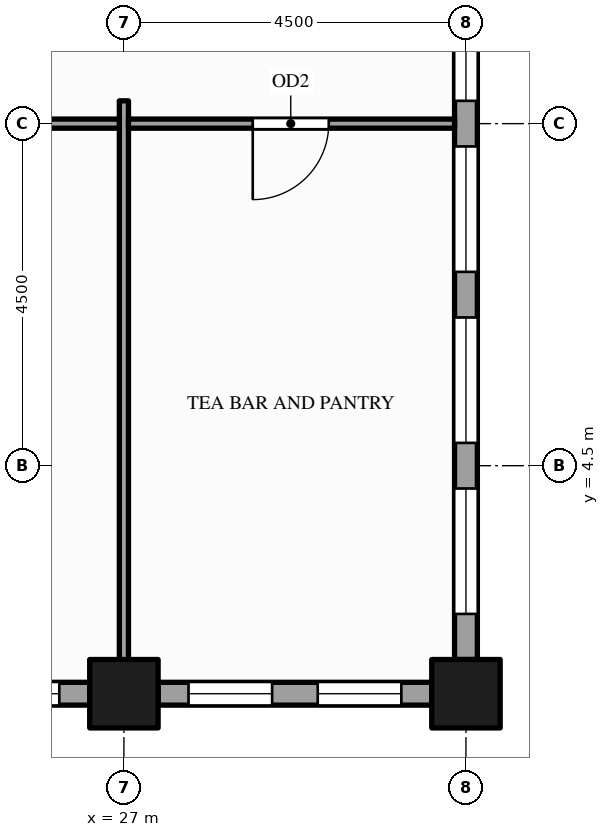
"""IFC4 building model, lengths in metres.
Left out: names, types, materials, properties, quantities, classifications, styles, units other than length and angle.
Written with IfcOpenShell. Run it as: python <this file> out.ifc"""

import sys

from ifc_helpers import new_model, si_unit, direction, frame, frame_2d, origin, origin_2d, place, context, subcontext, project, spatial, rectangle, hollow_rectangle, extrude, element, fill, save


model = new_model("IFC4")
c1 = context("Model", 3, precision=1e-05, world=origin(), true_north=direction((0.0, 1.0)))
c2 = subcontext(c1, "Body", "Model", "MODEL_VIEW")
j1 = project(units=[si_unit("LENGTHUNIT", "METRE"), si_unit("PLANEANGLEUNIT", "RADIAN")], contexts=[c1])
p1 = place(None, origin())
s1 = spatial("IfcSite", under=j1, at=p1, CompositionType="ELEMENT")
p2 = place(p1, origin())
s2 = spatial("IfcBuilding", under=s1, at=p2, CompositionType="ELEMENT")
p3 = place(p2, frame((0.0, 0.0, 139.0)))
s3 = spatial("IfcBuildingStorey", under=s2, at=p3, CompositionType="ELEMENT", Elevation=139.0)
for number, where, z_axis, x_axis in (
    (1, (27.0, 1.5, -0.15), (0.0, 0.0, 1.0), (1.0, 0.0, 0.0)),
    (2, (31.5, 1.5, -0.15), (0.0, 0.0, 1.0), (1.0, 0.0, 0.0)),
):
    element("IfcColumn", number, at=place(p3, frame(where, z_axis=z_axis, x_axis=x_axis)), inside=s3, PredefinedType="COLUMN", context=c2, shape_type="SweptSolid", body=[
        extrude(hollow_rectangle(XDim=0.9, YDim=0.9, WallThickness=0.045, at=origin_2d()), origin(), (0.0, 0.0, 1.0), 4.0),
    ])
p4 = place(p3, frame((22.95, 1.5, 0.0), z_axis=(0.0, 0.0, 1.0), x_axis=(1.0, 0.0, 0.0)))
e3 = element("IfcWall", 3, at=p4, inside=s3, PredefinedType="STANDARD", context=c2, shape_type="SweptSolid", body=[
    extrude(rectangle(XDim=3.6, YDim=0.3, at=frame_2d((1.8, 0.0))), origin(), (0.0, 0.0, 1.0), 2.87),
])
p5 = place(p4, frame((0.4, 0.0, 0.9)))
e4 = element("IfcOpeningElement", 4, at=p5, cuts=e3, PredefinedType="OPENING", context=c2, shape_type="SweptSolid", body=[
    extrude(rectangle(XDim=1.1, YDim=1.75, at=frame_2d((0.55, 0.875))), frame((0.0, 0.16, 0.0), z_axis=(0.0, -1.0, 0.0), x_axis=(1.0, 0.0, 0.0)), (0.0, 0.0, 1.0), 0.32),
])
p6 = place(p4, frame((2.1, 0.0, 0.9)))
e5 = element("IfcOpeningElement", 5, at=p6, cuts=e3, PredefinedType="OPENING", context=c2, shape_type="SweptSolid", body=[
    extrude(rectangle(XDim=1.1, YDim=1.75, at=frame_2d((0.55, 0.875))), frame((0.0, 0.16, 0.0), z_axis=(0.0, -1.0, 0.0), x_axis=(1.0, 0.0, 0.0)), (0.0, 0.0, 1.0), 0.32),
])
p7 = place(p3, frame((27.45, 1.5, 0.0), z_axis=(0.0, 0.0, 1.0), x_axis=(1.0, 0.0, 0.0)))
e6 = element("IfcWall", 6, at=p7, inside=s3, PredefinedType="STANDARD", context=c2, shape_type="SweptSolid", body=[
    extrude(rectangle(XDim=3.6, YDim=0.3, at=frame_2d((1.8, 0.0))), origin(), (0.0, 0.0, 1.0), 2.87),
])
p8 = place(p7, frame((0.4, 0.0, 0.9)))
e7 = element("IfcOpeningElement", 7, at=p8, cuts=e6, PredefinedType="OPENING", context=c2, shape_type="SweptSolid", body=[
    extrude(rectangle(XDim=1.1, YDim=1.75, at=frame_2d((0.55, 0.875))), frame((0.0, 0.16, 0.0), z_axis=(0.0, -1.0, 0.0), x_axis=(1.0, 0.0, 0.0)), (0.0, 0.0, 1.0), 0.32),
])
p9 = place(p7, frame((2.1, 0.0, 0.9)))
e8 = element("IfcOpeningElement", 8, at=p9, cuts=e6, PredefinedType="OPENING", context=c2, shape_type="SweptSolid", body=[
    extrude(rectangle(XDim=1.1, YDim=1.75, at=frame_2d((0.55, 0.875))), frame((0.0, 0.16, 0.0), z_axis=(0.0, -1.0, 0.0), x_axis=(1.0, 0.0, 0.0)), (0.0, 0.0, 1.0), 0.32),
])
p10 = place(p3, frame((31.5, 1.95, 0.0), z_axis=(0.0, 0.0, 1.0), x_axis=(0.0, 1.0, 0.0)))
e9 = element("IfcWall", 9, at=p10, inside=s3, PredefinedType="STANDARD", context=c2, shape_type="SweptSolid", body=[
    extrude(rectangle(XDim=21.6, YDim=0.3, at=frame_2d((10.8, 0.0))), origin(), (0.0, 0.0, 1.0), 3.149),
])
p11 = place(p10, frame((0.6, 0.0, 0.9)))
e10 = element("IfcOpeningElement", 10, at=p11, cuts=e9, PredefinedType="OPENING", context=c2, shape_type="SweptSolid", body=[
    extrude(rectangle(XDim=1.65, YDim=2.0, at=frame_2d((0.825, 1.0))), frame((0.0, 0.16, 0.0), z_axis=(0.0, -1.0, 0.0), x_axis=(1.0, 0.0, 0.0)), (0.0, 0.0, 1.0), 0.32),
])
p12 = place(p10, frame((2.85, 0.0, 0.9)))
e11 = element("IfcOpeningElement", 11, at=p12, cuts=e9, PredefinedType="OPENING", context=c2, shape_type="SweptSolid", body=[
    extrude(rectangle(XDim=1.65, YDim=2.0, at=frame_2d((0.825, 1.0))), frame((0.0, 0.16, 0.0), z_axis=(0.0, -1.0, 0.0), x_axis=(1.0, 0.0, 0.0)), (0.0, 0.0, 1.0), 0.32),
])
p13 = place(p10, frame((5.1, 0.0, 0.9)))
e12 = element("IfcOpeningElement", 12, at=p13, cuts=e9, PredefinedType="OPENING", context=c2, shape_type="SweptSolid", body=[
    extrude(rectangle(XDim=1.65, YDim=2.0, at=frame_2d((0.825, 1.0))), frame((0.0, 0.16, 0.0), z_axis=(0.0, -1.0, 0.0), x_axis=(1.0, 0.0, 0.0)), (0.0, 0.0, 1.0), 0.32),
])
p14 = place(p10, frame((7.35, 0.0, 0.9)))
e13 = element("IfcOpeningElement", 13, at=p14, cuts=e9, PredefinedType="OPENING", context=c2, shape_type="SweptSolid", body=[
    extrude(rectangle(XDim=1.65, YDim=2.0, at=frame_2d((0.825, 1.0))), frame((0.0, 0.16, 0.0), z_axis=(0.0, -1.0, 0.0), x_axis=(1.0, 0.0, 0.0)), (0.0, 0.0, 1.0), 0.32),
])
p15 = place(p10, frame((9.6, 0.0, 0.9)))
e14 = element("IfcOpeningElement", 14, at=p15, cuts=e9, PredefinedType="OPENING", context=c2, shape_type="SweptSolid", body=[
    extrude(rectangle(XDim=1.65, YDim=2.0, at=frame_2d((0.825, 1.0))), frame((0.0, 0.16, 0.0), z_axis=(0.0, -1.0, 0.0), x_axis=(1.0, 0.0, 0.0)), (0.0, 0.0, 1.0), 0.32),
])
p16 = place(p10, frame((11.85, 0.0, 0.9)))
e15 = element("IfcOpeningElement", 15, at=p16, cuts=e9, PredefinedType="OPENING", context=c2, shape_type="SweptSolid", body=[
    extrude(rectangle(XDim=1.65, YDim=2.0, at=frame_2d((0.825, 1.0))), frame((0.0, 0.16, 0.0), z_axis=(0.0, -1.0, 0.0), x_axis=(1.0, 0.0, 0.0)), (0.0, 0.0, 1.0), 0.32),
])
p17 = place(p10, frame((14.1, 0.0, 0.9)))
e16 = element("IfcOpeningElement", 16, at=p17, cuts=e9, PredefinedType="OPENING", context=c2, shape_type="SweptSolid", body=[
    extrude(rectangle(XDim=1.65, YDim=2.0, at=frame_2d((0.825, 1.0))), frame((0.0, 0.16, 0.0), z_axis=(0.0, -1.0, 0.0), x_axis=(1.0, 0.0, 0.0)), (0.0, 0.0, 1.0), 0.32),
])
p18 = place(p10, frame((16.35, 0.0, 0.9)))
e17 = element("IfcOpeningElement", 17, at=p18, cuts=e9, PredefinedType="OPENING", context=c2, shape_type="SweptSolid", body=[
    extrude(rectangle(XDim=1.65, YDim=2.0, at=frame_2d((0.825, 1.0))), frame((0.0, 0.16, 0.0), z_axis=(0.0, -1.0, 0.0), x_axis=(1.0, 0.0, 0.0)), (0.0, 0.0, 1.0), 0.32),
])
p19 = place(p10, frame((18.6, 0.0, 0.9)))
e18 = element("IfcOpeningElement", 18, at=p19, cuts=e9, PredefinedType="OPENING", context=c2, shape_type="SweptSolid", body=[
    extrude(rectangle(XDim=1.65, YDim=2.0, at=frame_2d((0.825, 1.0))), frame((0.0, 0.16, 0.0), z_axis=(0.0, -1.0, 0.0), x_axis=(1.0, 0.0, 0.0)), (0.0, 0.0, 1.0), 0.32),
])
p20 = place(p3, frame((27.0, 1.65, 0.0), z_axis=(0.0, 0.0, 1.0), x_axis=(0.0, 1.0, 0.0)))
e19 = element("IfcWall", 19, at=p20, inside=s3, PredefinedType="PARTITIONING", context=c2, shape_type="SweptSolid", body=[
    extrude(rectangle(XDim=7.65, YDim=0.12, at=frame_2d((3.825, 0.0))), origin(), (0.0, 0.0, 1.0), 2.87),
])
p21 = place(p3, frame((18.06, 9.0, 0.0), z_axis=(0.0, 0.0, 1.0), x_axis=(1.0, 0.0, 0.0)))
e20 = element("IfcWall", 20, at=p21, inside=s3, PredefinedType="PARTITIONING", context=c2, shape_type="SweptSolid", body=[
    extrude(rectangle(XDim=8.88, YDim=0.12, at=frame_2d((4.44, 0.0))), origin(), (0.0, 0.0, 1.0), 2.87),
])
p22 = place(p21, frame((3.54, 0.0, 0.0)))
e21 = element("IfcOpeningElement", 21, at=p22, cuts=e20, PredefinedType="OPENING", context=c2, shape_type="SweptSolid", body=[
    extrude(rectangle(XDim=1.8, YDim=2.1, at=frame_2d((0.9, 1.05))), frame((0.0, 0.07, 0.0), z_axis=(0.0, -1.0, 0.0), x_axis=(1.0, 0.0, 0.0)), (0.0, 0.0, 1.0), 0.14),
])
p23 = place(p3, frame((27.06, 9.0, 0.0), z_axis=(0.0, 0.0, 1.0), x_axis=(1.0, 0.0, 0.0)))
e22 = element("IfcWall", 22, at=p23, inside=s3, PredefinedType="PARTITIONING", context=c2, shape_type="SweptSolid", body=[
    extrude(rectangle(XDim=4.29, YDim=0.12, at=frame_2d((2.145, 0.0))), origin(), (0.0, 0.0, 1.0), 2.87),
])
p24 = place(p23, frame((1.635, 0.0, 0.0)))
e23 = element("IfcOpeningElement", 23, at=p24, cuts=e22, PredefinedType="OPENING", context=c2, shape_type="SweptSolid", body=[
    extrude(rectangle(XDim=1.0, YDim=2.1, at=frame_2d((0.5, 1.05))), frame((0.0, 0.07, 0.0), z_axis=(0.0, -1.0, 0.0), x_axis=(1.0, 0.0, 0.0)), (0.0, 0.0, 1.0), 0.14),
])
p25 = place(p6, origin())
e24 = element("IfcWindow", 24, at=p25, inside=s3, PartitioningType="SINGLE_PANEL", PredefinedType="WINDOW", context=c2, shape_type="SweptSolid", body=[
    extrude(rectangle(XDim=1.1, YDim=1.75, at=frame_2d((0.55, 0.875))), frame((0.0, 0.03, 0.0), z_axis=(0.0, -1.0, 0.0), x_axis=(1.0, 0.0, 0.0)), (0.0, 0.0, 1.0), 0.06),
])
fill(e5, e24)
p26 = place(p8, origin())
e25 = element("IfcWindow", 25, at=p26, inside=s3, PartitioningType="SINGLE_PANEL", PredefinedType="WINDOW", context=c2, shape_type="SweptSolid", body=[
    extrude(rectangle(XDim=1.1, YDim=1.75, at=frame_2d((0.55, 0.875))), frame((0.0, 0.03, 0.0), z_axis=(0.0, -1.0, 0.0), x_axis=(1.0, 0.0, 0.0)), (0.0, 0.0, 1.0), 0.06),
])
fill(e7, e25)
p27 = place(p9, origin())
e26 = element("IfcWindow", 26, at=p27, inside=s3, PartitioningType="SINGLE_PANEL", PredefinedType="WINDOW", context=c2, shape_type="SweptSolid", body=[
    extrude(rectangle(XDim=1.1, YDim=1.75, at=frame_2d((0.55, 0.875))), frame((0.0, 0.03, 0.0), z_axis=(0.0, -1.0, 0.0), x_axis=(1.0, 0.0, 0.0)), (0.0, 0.0, 1.0), 0.06),
])
fill(e8, e26)
p28 = place(p11, origin())
e27 = element("IfcWindow", 27, at=p28, inside=s3, PartitioningType="SINGLE_PANEL", PredefinedType="WINDOW", context=c2, shape_type="SweptSolid", body=[
    extrude(rectangle(XDim=1.65, YDim=2.0, at=frame_2d((0.825, 1.0))), frame((0.0, 0.03, 0.0), z_axis=(0.0, -1.0, 0.0), x_axis=(1.0, 0.0, 0.0)), (0.0, 0.0, 1.0), 0.06),
])
fill(e10, e27)
p29 = place(p12, origin())
e28 = element("IfcWindow", 28, at=p29, inside=s3, PartitioningType="SINGLE_PANEL", PredefinedType="WINDOW", context=c2, shape_type="SweptSolid", body=[
    extrude(rectangle(XDim=1.65, YDim=2.0, at=frame_2d((0.825, 1.0))), frame((0.0, 0.03, 0.0), z_axis=(0.0, -1.0, 0.0), x_axis=(1.0, 0.0, 0.0)), (0.0, 0.0, 1.0), 0.06),
])
fill(e11, e28)
p30 = place(p13, origin())
e29 = element("IfcWindow", 29, at=p30, inside=s3, PartitioningType="SINGLE_PANEL", PredefinedType="WINDOW", context=c2, shape_type="SweptSolid", body=[
    extrude(rectangle(XDim=1.65, YDim=2.0, at=frame_2d((0.825, 1.0))), frame((0.0, 0.03, 0.0), z_axis=(0.0, -1.0, 0.0), x_axis=(1.0, 0.0, 0.0)), (0.0, 0.0, 1.0), 0.06),
])
fill(e12, e29)
p31 = place(p14, origin())
e30 = element("IfcWindow", 30, at=p31, inside=s3, PartitioningType="SINGLE_PANEL", PredefinedType="WINDOW", context=c2, shape_type="SweptSolid", body=[
    extrude(rectangle(XDim=1.65, YDim=2.0, at=frame_2d((0.825, 1.0))), frame((0.0, 0.03, 0.0), z_axis=(0.0, -1.0, 0.0), x_axis=(1.0, 0.0, 0.0)), (0.0, 0.0, 1.0), 0.06),
])
fill(e13, e30)
p32 = place(p24, origin())
e31 = element("IfcDoor", 31, at=p32, inside=s3, OperationType="SINGLE_SWING_LEFT", PredefinedType="DOOR", context=c2, shape_type="SweptSolid", body=[
    extrude(rectangle(XDim=1.0, YDim=2.1, at=frame_2d((0.5, 1.05))), frame((0.0, 0.025, 0.0), z_axis=(0.0, -1.0, 0.0), x_axis=(1.0, 0.0, 0.0)), (0.0, 0.0, 1.0), 0.05),
])
fill(e23, e31)
save(model, sys.argv[1])
